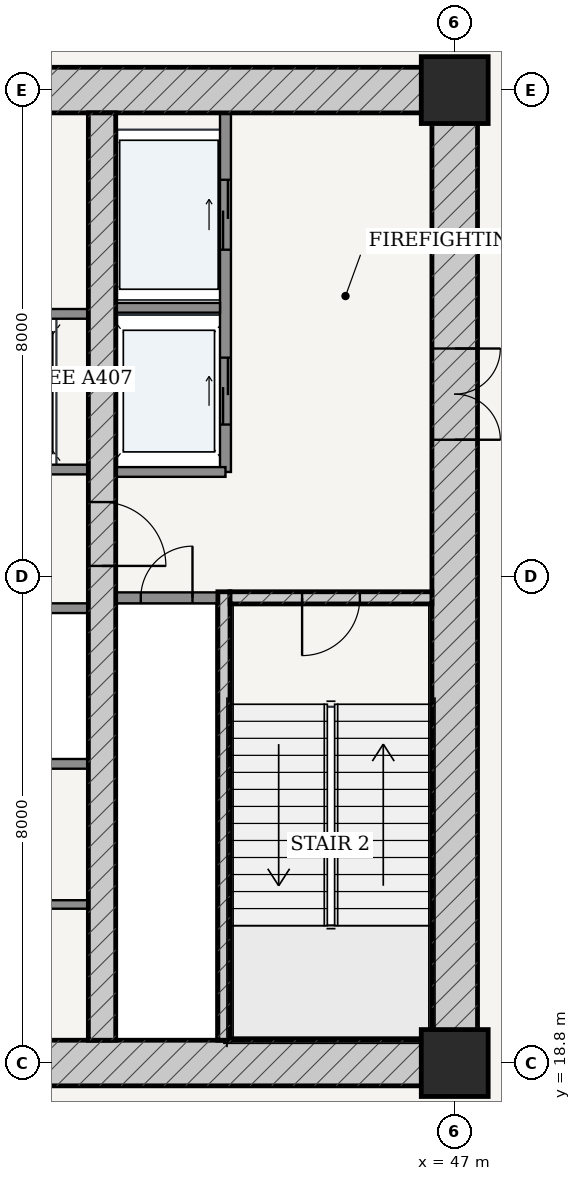
"""IFC4 building model, lengths in metres.
Left out: names, types, materials, properties, quantities, classifications, styles, units other than length and angle.
Written with IfcOpenShell. Run it as: python <this file> out.ifc"""

import sys

from ifc_helpers import new_model, si_unit, direction, frame, frame_2d, origin, origin_2d, place, context, subcontext, project, spatial, rectangle, extrude, source, transform, mapped, element, fill, save


model = new_model("IFC4")
c1 = context("Model", 3, precision=1e-05, world=origin(), true_north=direction((-0.2419218956, 0.970295726276)))
c2 = subcontext(c1, "Body", "Model", "MODEL_VIEW")
j1 = project(units=[si_unit("LENGTHUNIT", "METRE"), si_unit("PLANEANGLEUNIT", "RADIAN")], contexts=[c1])
p1 = place(None, origin())
s1 = spatial("IfcSite", under=j1, at=p1, CompositionType="ELEMENT")
p2 = place(p1, origin())
s2 = spatial("IfcBuilding", under=s1, at=p2, CompositionType="ELEMENT")
p3 = place(p2, frame((0.0, 0.0, 18.9)))
s3 = spatial("IfcBuildingStorey", under=s2, at=p3, CompositionType="ELEMENT", Elevation=18.9)
for number, where, z_axis, x_axis in (
    (1, (47.0, 18.8, 0.0), (0.0, 0.0, 1.0), (1.0, 0.0, 0.0)),
    (2, (47.0, 34.8, 0.0), (0.0, 0.0, 1.0), (1.0, 0.0, 0.0)),
):
    element("IfcColumn", number, at=place(p3, frame(where, z_axis=z_axis, x_axis=x_axis)), inside=s3, PredefinedType="COLUMN", context=c2, shape_type="SweptSolid", body=[
        extrude(rectangle(XDim=1.1, YDim=1.1, at=origin_2d()), origin(), (0.0, 0.0, 1.0), 5.1),
    ])
p4 = place(p3, frame((28.625, 18.8, 0.0), z_axis=(0.0, 0.0, 1.0), x_axis=(1.0, 0.0, 0.0)))
e3 = element("IfcWall", 3, at=p4, inside=s3, PredefinedType="SHEAR", context=c2, shape_type="SweptSolid", body=[
    extrude(rectangle(XDim=18.75, YDim=0.75, at=frame_2d((9.375, 0.0))), origin(), (0.0, 0.0, 1.0), 4.82),
])
p5 = place(p4, frame((8.95, 0.0, 0.0)))
e4 = element("IfcOpeningElement", 4, at=p5, cuts=e3, PredefinedType="OPENING", context=c2, shape_type="SweptSolid", body=[
    extrude(rectangle(XDim=0.85, YDim=2.1, at=frame_2d((0.425, 1.05))), frame((0.0, 0.385, 0.0), z_axis=(0.0, -1.0, 0.0), x_axis=(1.0, 0.0, 0.0)), (0.0, 0.0, 1.0), 0.77),
])
p6 = place(p3, frame((28.625, 34.8, 0.0), z_axis=(0.0, 0.0, 1.0), x_axis=(1.0, 0.0, 0.0)))
e5 = element("IfcWall", 5, at=p6, inside=s3, PredefinedType="SHEAR", context=c2, shape_type="SweptSolid", body=[
    extrude(rectangle(XDim=18.75, YDim=0.75, at=frame_2d((9.375, 0.0))), origin(), (0.0, 0.0, 1.0), 4.82),
])
p7 = place(p6, frame((8.95, 0.0, 0.0)))
e6 = element("IfcOpeningElement", 6, at=p7, cuts=e5, PredefinedType="OPENING", context=c2, shape_type="SweptSolid", body=[
    extrude(rectangle(XDim=0.85, YDim=2.1, at=frame_2d((0.425, 1.05))), frame((0.0, 0.385, 0.0), z_axis=(0.0, -1.0, 0.0), x_axis=(1.0, 0.0, 0.0)), (0.0, 0.0, 1.0), 0.77),
])
p8 = place(p3, frame((47.0, 19.175, 0.0), z_axis=(0.0, 0.0, 1.0), x_axis=(0.0, 1.0, 0.0)))
e7 = element("IfcWall", 7, at=p8, inside=s3, PredefinedType="SHEAR", context=c2, shape_type="SweptSolid", body=[
    extrude(rectangle(XDim=15.25, YDim=0.75, at=frame_2d((7.625, 0.0))), origin(), (0.0, 0.0, 1.0), 4.82),
])
p9 = place(p8, frame((9.875, 0.0, 0.0)))
e8 = element("IfcOpeningElement", 8, at=p9, cuts=e7, PredefinedType="OPENING", context=c2, shape_type="SweptSolid", body=[
    extrude(rectangle(XDim=1.5, YDim=2.2, at=frame_2d((0.75, 1.1))), frame((0.0, 0.385, 0.0), z_axis=(0.0, -1.0, 0.0), x_axis=(1.0, 0.0, 0.0)), (0.0, 0.0, 1.0), 0.77),
])
p10 = place(p3, frame((43.205, 19.175, 0.0), z_axis=(0.0, 0.0, 1.0), x_axis=(0.0, 1.0, 0.0)))
e9 = element("IfcWall", 9, at=p10, inside=s3, PredefinedType="SOLIDWALL", context=c2, shape_type="SweptSolid", body=[
    extrude(rectangle(XDim=7.375, YDim=0.2, at=frame_2d((3.688, 0.0))), origin(), (0.0, 0.0, 1.0), 4.82),
])
p11 = place(p3, frame((43.305, 26.45, 0.0), z_axis=(0.0, 0.0, 1.0), x_axis=(1.0, 0.0, 0.0)))
e10 = element("IfcWall", 10, at=p11, inside=s3, PredefinedType="SOLIDWALL", context=c2, shape_type="SweptSolid", body=[
    extrude(rectangle(XDim=3.32, YDim=0.2, at=frame_2d((1.66, 0.0))), origin(), (0.0, 0.0, 1.0), 4.82),
])
p12 = place(p11, frame((1.185, 0.0, 0.0)))
e11 = element("IfcOpeningElement", 11, at=p12, cuts=e10, PredefinedType="OPENING", context=c2, shape_type="SweptSolid", body=[
    extrude(rectangle(XDim=0.95, YDim=2.15, at=frame_2d((0.475, 1.075))), frame((0.0, 0.11, 0.0), z_axis=(0.0, -1.0, 0.0), x_axis=(1.0, 0.0, 0.0)), (0.0, 0.0, 1.0), 0.22),
])
p13 = place(p3, frame((41.2, 19.175, 0.0), z_axis=(0.0, 0.0, 1.0), x_axis=(0.0, 1.0, 0.0)))
e12 = element("IfcWall", 12, at=p13, inside=s3, PredefinedType="SHEAR", context=c2, shape_type="SweptSolid", body=[
    extrude(rectangle(XDim=15.25, YDim=0.45, at=frame_2d((7.625, 0.0))), origin(), (0.0, 0.0, 1.0), 4.82),
])
p14 = place(p13, frame((7.8, 0.0, 0.0)))
e13 = element("IfcOpeningElement", 13, at=p14, cuts=e12, PredefinedType="OPENING", context=c2, shape_type="SweptSolid", body=[
    extrude(rectangle(XDim=1.05, YDim=2.15, at=frame_2d((0.525, 1.075))), frame((0.0, 0.235, 0.0), z_axis=(0.0, -1.0, 0.0), x_axis=(1.0, 0.0, 0.0)), (0.0, 0.0, 1.0), 0.47),
])
p15 = place(p3, frame((41.425, 26.45, 0.0), z_axis=(0.0, 0.0, 1.0), x_axis=(1.0, 0.0, 0.0)))
e14 = element("IfcWall", 14, at=p15, inside=s3, PredefinedType="PARTITIONING", context=c2, shape_type="SweptSolid", body=[
    extrude(rectangle(XDim=1.675, YDim=0.18, at=frame_2d((0.837, 0.0))), origin(), (0.0, 0.0, 1.0), 4.82),
])
p16 = place(p15, frame((0.413, 0.0, 0.0)))
e15 = element("IfcOpeningElement", 15, at=p16, cuts=e14, PredefinedType="OPENING", context=c2, shape_type="SweptSolid", body=[
    extrude(rectangle(XDim=0.85, YDim=2.1, at=frame_2d((0.425, 1.05))), frame((0.0, 0.1, 0.0), z_axis=(0.0, -1.0, 0.0), x_axis=(1.0, 0.0, 0.0)), (0.0, 0.0, 1.0), 0.2),
])
p17 = place(p3, frame((43.23, 28.52, 0.0), z_axis=(0.0, 0.0, 1.0), x_axis=(0.0, 1.0, 0.0)))
e16 = element("IfcWall", 16, at=p17, inside=s3, PredefinedType="PARTITIONING", context=c2, shape_type="SweptSolid", body=[
    extrude(rectangle(XDim=5.905, YDim=0.18, at=frame_2d((2.953, 0.0))), origin(), (0.0, 0.0, 1.0), 4.82),
])
p18 = place(p17, frame((3.655, 0.0, 0.0)))
e17 = element("IfcOpeningElement", 17, at=p18, cuts=e16, PredefinedType="OPENING", context=c2, shape_type="SweptSolid", body=[
    extrude(rectangle(XDim=1.15, YDim=2.2, at=frame_2d((0.575, 1.1))), frame((0.0, 0.1, 0.0), z_axis=(0.0, -1.0, 0.0), x_axis=(1.0, 0.0, 0.0)), (0.0, 0.0, 1.0), 0.2),
])
p19 = place(p17, frame((0.78, 0.0, 0.0)))
e18 = element("IfcOpeningElement", 18, at=p19, cuts=e16, PredefinedType="OPENING", context=c2, shape_type="SweptSolid", body=[
    extrude(rectangle(XDim=1.1, YDim=2.2, at=frame_2d((0.55, 1.1))), frame((0.0, 0.1, 0.0), z_axis=(0.0, -1.0, 0.0), x_axis=(1.0, 0.0, 0.0)), (0.0, 0.0, 1.0), 0.2),
])
p20 = place(p3, frame((41.425, 31.22, 0.0), z_axis=(0.0, 0.0, 1.0), x_axis=(1.0, 0.0, 0.0)))
e19 = element("IfcWall", 19, at=p20, inside=s3, PredefinedType="PARTITIONING", context=c2, shape_type="SweptSolid", body=[
    extrude(rectangle(XDim=1.715, YDim=0.16, at=frame_2d((0.857, 0.0))), origin(), (0.0, 0.0, 1.0), 4.82),
])
p21 = place(p3, frame((41.425, 28.52, 0.0), z_axis=(0.0, 0.0, 1.0), x_axis=(1.0, 0.0, 0.0)))
e20 = element("IfcWall", 20, at=p21, inside=s3, PredefinedType="PARTITIONING", context=c2, shape_type="SweptSolid", body=[
    extrude(rectangle(XDim=1.805, YDim=0.16, at=frame_2d((0.902, 0.0))), origin(), (0.0, 0.0, 1.0), 4.82),
])
p22 = place(p3, frame((35.025, 28.56, 0.0), z_axis=(0.0, 0.0, 1.0), x_axis=(1.0, 0.0, 0.0)))
e21 = element("IfcWall", 21, at=p22, inside=s3, PredefinedType="PARTITIONING", context=c2, shape_type="SweptSolid", body=[
    extrude(rectangle(XDim=5.95, YDim=0.16, at=frame_2d((2.975, 0.0))), origin(), (0.0, 0.0, 1.0), 4.82),
])
p23 = place(p22, frame((0.76, 0.0, 0.0)))
e22 = element("IfcOpeningElement", 22, at=p23, cuts=e21, PredefinedType="OPENING", context=c2, shape_type="SweptSolid", body=[
    extrude(rectangle(XDim=1.1, YDim=2.2, at=frame_2d((0.55, 1.1))), frame((0.0, 0.09, 0.0), z_axis=(0.0, -1.0, 0.0), x_axis=(1.0, 0.0, 0.0)), (0.0, 0.0, 1.0), 0.18),
])
p24 = place(p22, frame((2.425, 0.0, 0.0)))
e23 = element("IfcOpeningElement", 23, at=p24, cuts=e21, PredefinedType="OPENING", context=c2, shape_type="SweptSolid", body=[
    extrude(rectangle(XDim=1.1, YDim=2.2, at=frame_2d((0.55, 1.1))), frame((0.0, 0.09, 0.0), z_axis=(0.0, -1.0, 0.0), x_axis=(1.0, 0.0, 0.0)), (0.0, 0.0, 1.0), 0.18),
])
p25 = place(p22, frame((4.09, 0.0, 0.0)))
e24 = element("IfcOpeningElement", 24, at=p25, cuts=e21, PredefinedType="OPENING", context=c2, shape_type="SweptSolid", body=[
    extrude(rectangle(XDim=1.1, YDim=2.2, at=frame_2d((0.55, 1.1))), frame((0.0, 0.09, 0.0), z_axis=(0.0, -1.0, 0.0), x_axis=(1.0, 0.0, 0.0)), (0.0, 0.0, 1.0), 0.18),
])
for number, where, z_axis, x_axis in (
    (25, (35.025, 31.12, 0.0), (0.0, 0.0, 1.0), (1.0, 0.0, 0.0)),
    (26, (35.025, 26.28, 0.0), (0.0, 0.0, 1.0), (1.0, 0.0, 0.0)),
    (27, (35.025, 23.72, 0.0), (0.0, 0.0, 1.0), (1.0, 0.0, 0.0)),
):
    element("IfcWall", number, at=place(p3, frame(where, z_axis=z_axis, x_axis=x_axis)), inside=s3, PredefinedType="PARTITIONING", context=c2, shape_type="SweptSolid", body=[
        extrude(rectangle(XDim=5.95, YDim=0.16, at=frame_2d((2.975, 0.0))), origin(), (0.0, 0.0, 1.0), 4.82),
    ])
p26 = place(p3, frame((35.025, 21.407, 0.0), z_axis=(0.0, 0.0, 1.0), x_axis=(1.0, 0.0, 0.0)))
e28 = element("IfcWall", 28, at=p26, inside=s3, PredefinedType="PARTITIONING", context=c2, shape_type="SweptSolid", body=[
    extrude(rectangle(XDim=5.95, YDim=0.14, at=frame_2d((2.975, 0.0))), origin(), (0.0, 0.0, 1.0), 4.82),
])
p27 = place(p26, frame((2.55, 0.0, 0.0)))
e29 = element("IfcOpeningElement", 29, at=p27, cuts=e28, PredefinedType="OPENING", context=c2, shape_type="SweptSolid", body=[
    extrude(rectangle(XDim=0.85, YDim=2.1, at=frame_2d((0.425, 1.05))), frame((0.0, 0.08, 0.0), z_axis=(0.0, -1.0, 0.0), x_axis=(1.0, 0.0, 0.0)), (0.0, 0.0, 1.0), 0.16),
])
m1 = source(origin(), c2, "Body", "SweptSolid", [
    extrude(rectangle(XDim=1.5, YDim=2.2, at=frame_2d((0.75, 1.1))), frame((0.0, 0.025, 0.0), z_axis=(0.0, -1.0, 0.0), x_axis=(1.0, 0.0, 0.0)), (0.0, 0.0, 1.0), 0.05),
])
p28 = place(p9, frame((1.5, 0.0, 0.0), z_axis=(0.0, 0.0, 1.0), x_axis=(-1.0, 0.0, 0.0)))
e30 = element("IfcDoor", 30, at=p28, inside=s3, OperationType="DOUBLE_DOOR_SINGLE_SWING", PredefinedType="DOOR", context=c2, shape_type="MappedRepresentation", body=[
    mapped(m1, transform((0.0, 0.0, 0.0), scale=1.0)),
])
fill(e8, e30)
m2 = source(origin(), c2, "Body", "SweptSolid", [
    extrude(rectangle(XDim=1.05, YDim=2.15, at=frame_2d((0.525, 1.075))), frame((0.0, 0.025, 0.0), z_axis=(0.0, -1.0, 0.0), x_axis=(1.0, 0.0, 0.0)), (0.0, 0.0, 1.0), 0.05),
])
p29 = place(p14, frame((1.05, 0.0, 0.0), z_axis=(0.0, 0.0, 1.0), x_axis=(-1.0, 0.0, 0.0)))
e31 = element("IfcDoor", 31, at=p29, inside=s3, OperationType="SINGLE_SWING_RIGHT", PredefinedType="DOOR", context=c2, shape_type="MappedRepresentation", body=[
    mapped(m2, transform((0.0, 0.0, 0.0), scale=1.0)),
])
fill(e13, e31)
m3 = source(origin(), c2, "Body", "SweptSolid", [
    extrude(rectangle(XDim=0.95, YDim=2.15, at=frame_2d((0.475, 1.075))), frame((0.0, 0.025, 0.0), z_axis=(0.0, -1.0, 0.0), x_axis=(1.0, 0.0, 0.0)), (0.0, 0.0, 1.0), 0.05),
])
p30 = place(p12, frame((0.95, 0.0, 0.0), z_axis=(0.0, 0.0, 1.0), x_axis=(-1.0, 0.0, 0.0)))
e32 = element("IfcDoor", 32, at=p30, inside=s3, OperationType="SINGLE_SWING_RIGHT", PredefinedType="DOOR", context=c2, shape_type="MappedRepresentation", body=[
    mapped(m3, transform((0.0, 0.0, 0.0), scale=1.0)),
])
fill(e11, e32)
m4 = source(origin(), c2, "Body", "SweptSolid", [
    extrude(rectangle(XDim=0.85, YDim=2.1, at=frame_2d((0.425, 1.05))), frame((0.0, 0.025, 0.0), z_axis=(0.0, -1.0, 0.0), x_axis=(1.0, 0.0, 0.0)), (0.0, 0.0, 1.0), 0.05),
])
p31 = place(p16, origin())
e33 = element("IfcDoor", 33, at=p31, inside=s3, OperationType="SINGLE_SWING_RIGHT", PredefinedType="DOOR", context=c2, shape_type="MappedRepresentation", body=[
    mapped(m4, transform((0.0, 0.0, 0.0), scale=1.0)),
])
fill(e15, e33)
m5 = source(origin(), c2, "Body", "SweptSolid", [
    extrude(rectangle(XDim=1.15, YDim=2.2, at=frame_2d((0.575, 1.1))), frame((0.0, 0.025, 0.0), z_axis=(0.0, -1.0, 0.0), x_axis=(1.0, 0.0, 0.0)), (0.0, 0.0, 1.0), 0.05),
])
p32 = place(p18, origin())
e34 = element("IfcDoor", 34, at=p32, inside=s3, OperationType="DOUBLE_DOOR_SLIDING", PredefinedType="DOOR", context=c2, shape_type="MappedRepresentation", body=[
    mapped(m5, transform((0.0, 0.0, 0.0), scale=1.0)),
])
fill(e17, e34)
m6 = source(origin(), c2, "Body", "SweptSolid", [
    extrude(rectangle(XDim=1.1, YDim=2.2, at=frame_2d((0.55, 1.1))), frame((0.0, 0.025, 0.0), z_axis=(0.0, -1.0, 0.0), x_axis=(1.0, 0.0, 0.0)), (0.0, 0.0, 1.0), 0.05),
])
p33 = place(p19, origin())
e35 = element("IfcDoor", 35, at=p33, inside=s3, OperationType="DOUBLE_DOOR_SLIDING", PredefinedType="DOOR", context=c2, shape_type="MappedRepresentation", body=[
    mapped(m6, transform((0.0, 0.0, 0.0), scale=1.0)),
])
fill(e18, e35)
save(model, sys.argv[1])
